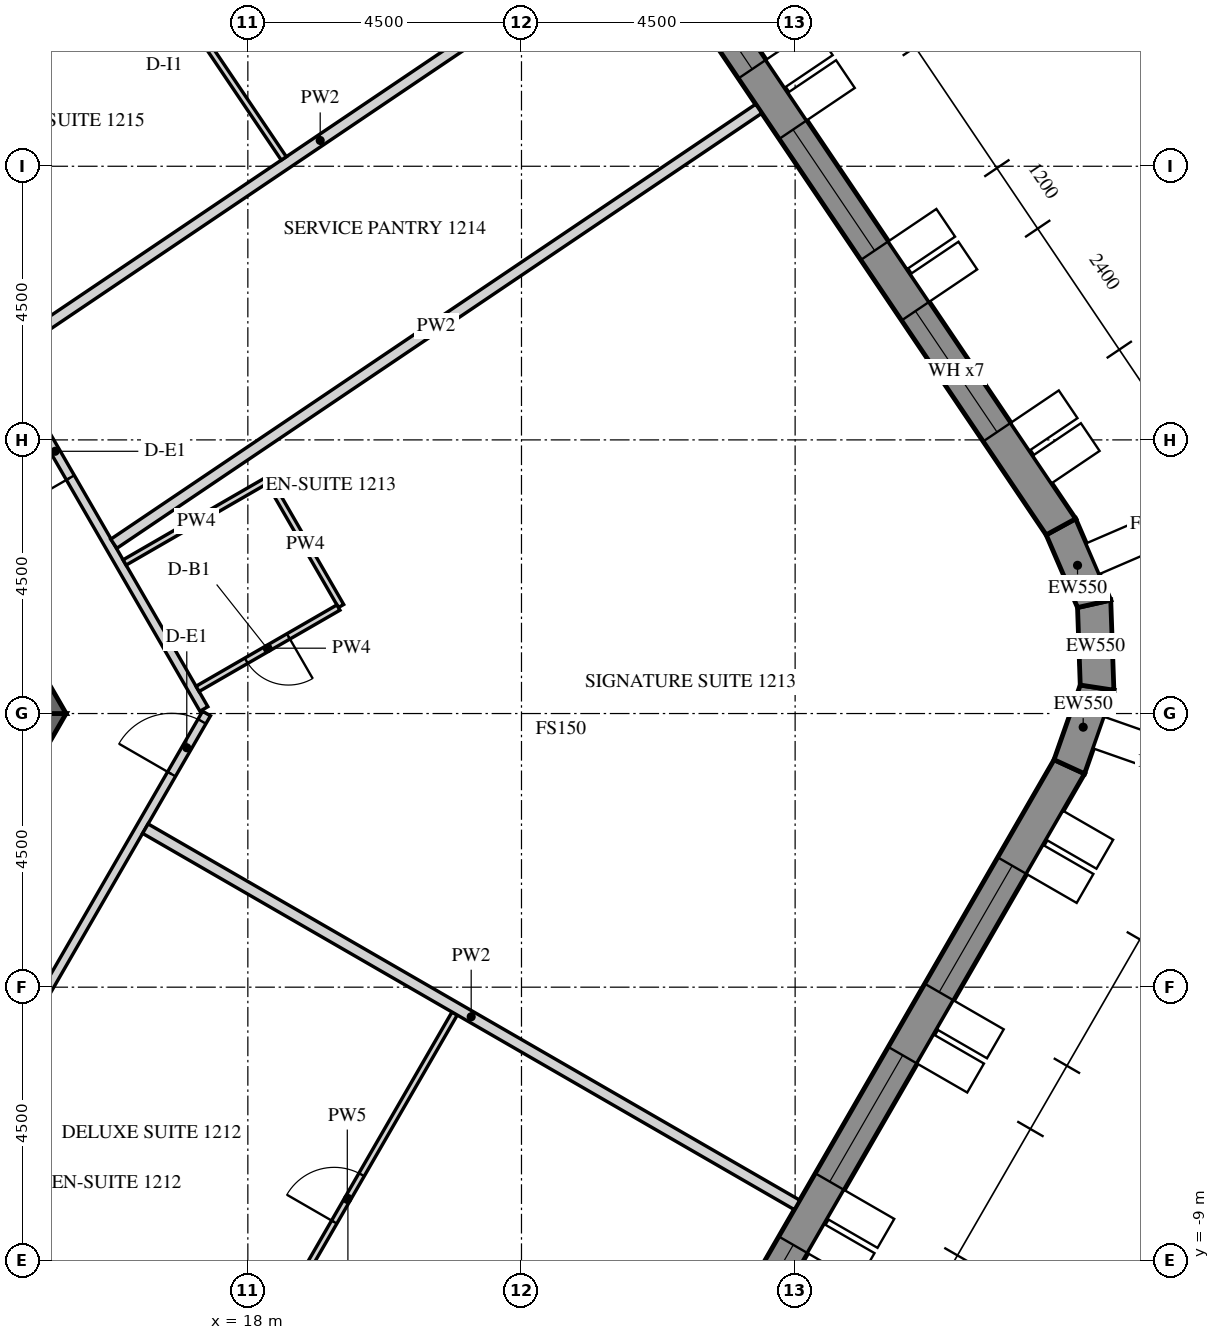
"""IFC4 building model, lengths in metres.
Left out: names, types, materials, properties, quantities, classifications, styles, units other than length and angle.
Written with IfcOpenShell. Run it as: python <this file> out.ifc"""

import sys

from ifc_helpers import new_model, si_unit, direction, frame, frame_2d, origin, place, context, subcontext, project, spatial, polyline, rectangle, outline, extrude, element, fill, save


model = new_model("IFC4")
c1 = context("Model", 3, precision=1e-05, world=origin(), true_north=direction((0.0, 1.0)))
c2 = subcontext(c1, "Body", "Model", "MODEL_VIEW")
j1 = project(units=[si_unit("LENGTHUNIT", "METRE"), si_unit("PLANEANGLEUNIT", "RADIAN")], contexts=[c1])
p1 = place(None, origin())
s1 = spatial("IfcSite", under=j1, at=p1, CompositionType="ELEMENT")
p2 = place(p1, origin())
s2 = spatial("IfcBuilding", under=s1, at=p2, CompositionType="ELEMENT")
p3 = place(p2, frame((0.0, 0.0, 164.4)))
s3 = spatial("IfcBuildingStorey", under=s2, at=p3, CompositionType="ELEMENT", Elevation=164.4)
p4 = place(p3, frame((17.63, -24.914, -0.15), z_axis=(0.0, 0.0, 1.0), x_axis=(0.499998569178, 0.866026229868, 0.0)))
e1 = element("IfcWall", 1, at=p4, inside=s3, PredefinedType="SOLIDWALL", context=c2, shape_type="SweptSolid", body=[
    extrude(outline(polyline([(-0.022, -0.275), (27.783, -0.275), (27.732, 0.275), (0.022, 0.275), (-0.022, -0.275)])), origin(), (0.0, 0.0, 1.0), 3.9),
])
p5 = place(p4, frame((1.879, 0.0, 1.05)))
e2 = element("IfcOpeningElement", 2, at=p5, cuts=e1, PredefinedType="OPENING", context=c2, shape_type="SweptSolid", body=[
    extrude(rectangle(XDim=2.4, YDim=2.4, at=frame_2d((1.2, 1.2))), frame((0.0, 0.285, 0.0), z_axis=(0.0, -1.0, 0.0), x_axis=(1.0, 0.0, 0.0)), (0.0, 0.0, 1.0), 0.57),
])
p6 = place(p4, frame((5.479, 0.0, 1.05)))
e3 = element("IfcOpeningElement", 3, at=p6, cuts=e1, PredefinedType="OPENING", context=c2, shape_type="SweptSolid", body=[
    extrude(rectangle(XDim=2.4, YDim=2.4, at=frame_2d((1.2, 1.2))), frame((0.0, 0.285, 0.0), z_axis=(0.0, -1.0, 0.0), x_axis=(1.0, 0.0, 0.0)), (0.0, 0.0, 1.0), 0.57),
])
p7 = place(p4, frame((9.079, 0.0, 1.05)))
e4 = element("IfcOpeningElement", 4, at=p7, cuts=e1, PredefinedType="OPENING", context=c2, shape_type="SweptSolid", body=[
    extrude(rectangle(XDim=2.4, YDim=2.4, at=frame_2d((1.2, 1.2))), frame((0.0, 0.285, 0.0), z_axis=(0.0, -1.0, 0.0), x_axis=(1.0, 0.0, 0.0)), (0.0, 0.0, 1.0), 0.57),
])
p8 = place(p4, frame((12.679, 0.0, 1.05)))
e5 = element("IfcOpeningElement", 5, at=p8, cuts=e1, PredefinedType="OPENING", context=c2, shape_type="SweptSolid", body=[
    extrude(rectangle(XDim=2.4, YDim=2.4, at=frame_2d((1.2, 1.2))), frame((0.0, 0.285, 0.0), z_axis=(0.0, -1.0, 0.0), x_axis=(1.0, 0.0, 0.0)), (0.0, 0.0, 1.0), 0.57),
])
p9 = place(p4, frame((16.279, 0.0, 1.05)))
e6 = element("IfcOpeningElement", 6, at=p9, cuts=e1, PredefinedType="OPENING", context=c2, shape_type="SweptSolid", body=[
    extrude(rectangle(XDim=2.4, YDim=2.4, at=frame_2d((1.2, 1.2))), frame((0.0, 0.285, 0.0), z_axis=(0.0, -1.0, 0.0), x_axis=(1.0, 0.0, 0.0)), (0.0, 0.0, 1.0), 0.57),
])
p10 = place(p4, frame((19.879, 0.0, 1.05)))
e7 = element("IfcOpeningElement", 7, at=p10, cuts=e1, PredefinedType="OPENING", context=c2, shape_type="SweptSolid", body=[
    extrude(rectangle(XDim=2.4, YDim=2.4, at=frame_2d((1.2, 1.2))), frame((0.0, 0.285, 0.0), z_axis=(0.0, -1.0, 0.0), x_axis=(1.0, 0.0, 0.0)), (0.0, 0.0, 1.0), 0.57),
])
p11 = place(p4, frame((23.479, 0.0, 1.05)))
e8 = element("IfcOpeningElement", 8, at=p11, cuts=e1, PredefinedType="OPENING", context=c2, shape_type="SweptSolid", body=[
    extrude(rectangle(XDim=2.4, YDim=2.4, at=frame_2d((1.2, 1.2))), frame((0.0, 0.285, 0.0), z_axis=(0.0, -1.0, 0.0), x_axis=(1.0, 0.0, 0.0)), (0.0, 0.0, 1.0), 0.57),
])
p12 = place(p3, frame((31.509, -0.875, -0.15), z_axis=(0.0, 0.0, 1.0), x_axis=(0.33111537203, 0.943590276765, 0.0)))
e9 = element("IfcWall", 9, at=p12, inside=s3, PredefinedType="SOLIDWALL", context=c2, shape_type="SweptSolid", body=[
    extrude(outline(polyline([(-0.026, -0.275), (1.431, -0.275), (1.327, 0.275), (0.026, 0.275), (-0.026, -0.275)])), origin(), (0.0, 0.0, 1.0), 3.9),
])
p13 = place(p3, frame((31.966, 0.426, -0.15), z_axis=(0.0, 0.0, 1.0), x_axis=(-0.034876908462, 0.999391615562, 0.0)))
e10 = element("IfcWall", 10, at=p13, inside=s3, PredefinedType="SOLIDWALL", context=c2, shape_type="SweptSolid", body=[
    extrude(outline(polyline([(-0.052, -0.275), (1.431, -0.275), (1.327, 0.275), (0.052, 0.275), (-0.052, -0.275)])), origin(), (0.0, 0.0, 1.0), 3.9),
])
p14 = place(p3, frame((31.917, 1.804, -0.15), z_axis=(0.0, 0.0, 1.0), x_axis=(-0.396225741392, 0.918153125496, 0.0)))
e11 = element("IfcWall", 11, at=p14, inside=s3, PredefinedType="SOLIDWALL", context=c2, shape_type="SweptSolid", body=[
    extrude(outline(polyline([(-0.052, -0.275), (1.405, -0.275), (1.353, 0.275), (0.052, 0.275), (-0.052, -0.275)])), origin(), (0.0, 0.0, 1.0), 3.9),
])
p15 = place(p3, frame((31.371, 3.071, -0.15), z_axis=(0.0, 0.0, 1.0), x_axis=(-0.559189891278, 0.829039604297, 0.0)))
e12 = element("IfcWall", 12, at=p15, inside=s3, PredefinedType="SOLIDWALL", context=c2, shape_type="SweptSolid", body=[
    extrude(outline(polyline([(-0.026, -0.275), (27.781, -0.275), (27.736, 0.275), (0.026, 0.275), (-0.026, -0.275)])), origin(), (0.0, 0.0, 1.0), 3.9),
])
p16 = place(p15, frame((1.879, 0.0, 1.05)))
e13 = element("IfcOpeningElement", 13, at=p16, cuts=e12, PredefinedType="OPENING", context=c2, shape_type="SweptSolid", body=[
    extrude(rectangle(XDim=2.4, YDim=2.4, at=frame_2d((1.2, 1.2))), frame((0.0, 0.285, 0.0), z_axis=(0.0, -1.0, 0.0), x_axis=(1.0, 0.0, 0.0)), (0.0, 0.0, 1.0), 0.57),
])
p17 = place(p15, frame((5.479, 0.0, 1.05)))
e14 = element("IfcOpeningElement", 14, at=p17, cuts=e12, PredefinedType="OPENING", context=c2, shape_type="SweptSolid", body=[
    extrude(rectangle(XDim=2.4, YDim=2.4, at=frame_2d((1.2, 1.2))), frame((0.0, 0.285, 0.0), z_axis=(0.0, -1.0, 0.0), x_axis=(1.0, 0.0, 0.0)), (0.0, 0.0, 1.0), 0.57),
])
p18 = place(p15, frame((9.079, 0.0, 1.05)))
e15 = element("IfcOpeningElement", 15, at=p18, cuts=e12, PredefinedType="OPENING", context=c2, shape_type="SweptSolid", body=[
    extrude(rectangle(XDim=2.4, YDim=2.4, at=frame_2d((1.2, 1.2))), frame((0.0, 0.285, 0.0), z_axis=(0.0, -1.0, 0.0), x_axis=(1.0, 0.0, 0.0)), (0.0, 0.0, 1.0), 0.57),
])
p19 = place(p15, frame((12.679, 0.0, 1.05)))
e16 = element("IfcOpeningElement", 16, at=p19, cuts=e12, PredefinedType="OPENING", context=c2, shape_type="SweptSolid", body=[
    extrude(rectangle(XDim=2.4, YDim=2.4, at=frame_2d((1.2, 1.2))), frame((0.0, 0.285, 0.0), z_axis=(0.0, -1.0, 0.0), x_axis=(1.0, 0.0, 0.0)), (0.0, 0.0, 1.0), 0.57),
])
p20 = place(p15, frame((16.279, 0.0, 1.05)))
e17 = element("IfcOpeningElement", 17, at=p20, cuts=e12, PredefinedType="OPENING", context=c2, shape_type="SweptSolid", body=[
    extrude(rectangle(XDim=2.4, YDim=2.4, at=frame_2d((1.2, 1.2))), frame((0.0, 0.285, 0.0), z_axis=(0.0, -1.0, 0.0), x_axis=(1.0, 0.0, 0.0)), (0.0, 0.0, 1.0), 0.57),
])
p21 = place(p15, frame((19.879, 0.0, 1.05)))
e18 = element("IfcOpeningElement", 18, at=p21, cuts=e12, PredefinedType="OPENING", context=c2, shape_type="SweptSolid", body=[
    extrude(rectangle(XDim=2.4, YDim=2.4, at=frame_2d((1.2, 1.2))), frame((0.0, 0.285, 0.0), z_axis=(0.0, -1.0, 0.0), x_axis=(1.0, 0.0, 0.0)), (0.0, 0.0, 1.0), 0.57),
])
p22 = place(p15, frame((23.479, 0.0, 1.05)))
e19 = element("IfcOpeningElement", 19, at=p22, cuts=e12, PredefinedType="OPENING", context=c2, shape_type="SweptSolid", body=[
    extrude(rectangle(XDim=2.4, YDim=2.4, at=frame_2d((1.2, 1.2))), frame((0.0, 0.285, 0.0), z_axis=(0.0, -1.0, 0.0), x_axis=(1.0, 0.0, 0.0)), (0.0, 0.0, 1.0), 0.57),
])
p23 = place(p3, frame((7.361, -12.75, -0.15), z_axis=(0.0, 0.0, 1.0), x_axis=(0.50000571537, 0.866022103989, 0.0)))
e20 = element("IfcWall", 20, at=p23, inside=s3, PredefinedType="SHEAR", context=c2, shape_type="SweptSolid", body=[
    extrude(outline(polyline([(-0.144, -0.25), (14.867, -0.25), (14.578, 0.25), (0.144, 0.25), (-0.144, -0.25)])), origin(), (0.0, 0.0, 1.0), 3.9),
])
p24 = place(p23, frame((6.49, 0.0, 0.15)))
e21 = element("IfcOpeningElement", 21, at=p24, cuts=e20, PredefinedType="OPENING", context=c2, shape_type="SweptSolid", body=[
    extrude(rectangle(XDim=1.8, YDim=2.4, at=frame_2d((0.9, 1.2))), frame((0.0, 0.26, 0.0), z_axis=(0.0, -1.0, 0.0), x_axis=(1.0, 0.0, 0.0)), (0.0, 0.0, 1.0), 0.52),
])
p25 = place(p3, frame((14.722, 0.0, -0.15), z_axis=(0.0, 0.0, 1.0), x_axis=(-0.50000571537, 0.866022103989, 0.0)))
e22 = element("IfcWall", 22, at=p25, inside=s3, PredefinedType="SHEAR", context=c2, shape_type="SweptSolid", body=[
    extrude(outline(polyline([(-0.144, -0.25), (14.867, -0.25), (14.578, 0.25), (0.144, 0.25), (-0.144, -0.25)])), origin(), (0.0, 0.0, 1.0), 3.9),
])
p26 = place(p25, frame((6.432, 0.0, 0.15)))
e23 = element("IfcOpeningElement", 23, at=p26, cuts=e22, PredefinedType="OPENING", context=c2, shape_type="SweptSolid", body=[
    extrude(rectangle(XDim=1.8, YDim=2.4, at=frame_2d((0.9, 1.2))), frame((0.0, 0.26, 0.0), z_axis=(0.0, -1.0, 0.0), x_axis=(1.0, 0.0, 0.0)), (0.0, 0.0, 1.0), 0.52),
])
p27 = place(p3, frame((10.887, -11.144, 0.0), z_axis=(0.0, 0.0, 1.0), x_axis=(0.500006037985, 0.866021917724, 0.0)))
e24 = element("IfcWall", 24, at=p27, inside=s3, PredefinedType="PARTITIONING", context=c2, shape_type="SweptSolid", body=[
    extrude(rectangle(XDim=12.867, YDim=0.15, at=frame_2d((6.434, 0.0))), origin(), (0.0, 0.0, 1.0), 2.988),
])
p28 = place(p27, frame((6.225, 0.0, 0.0)))
e25 = element("IfcOpeningElement", 25, at=p28, cuts=e24, PredefinedType="OPENING", context=c2, shape_type="SweptSolid", body=[
    extrude(rectangle(XDim=1.0, YDim=2.1, at=frame_2d((0.5, 1.05))), frame((0.0, 0.085, 0.0), z_axis=(0.0, -1.0, 0.0), x_axis=(1.0, 0.0, 0.0)), (0.0, 0.0, 1.0), 0.17),
])
p29 = place(p27, frame((11.717, 0.0, 0.0)))
e26 = element("IfcOpeningElement", 26, at=p29, cuts=e24, PredefinedType="OPENING", context=c2, shape_type="SweptSolid", body=[
    extrude(rectangle(XDim=1.0, YDim=2.1, at=frame_2d((0.5, 1.05))), frame((0.0, 0.085, 0.0), z_axis=(0.0, -1.0, 0.0), x_axis=(1.0, 0.0, 0.0)), (0.0, 0.0, 1.0), 0.17),
])
p30 = place(p3, frame((17.277, 0.075, 0.0), z_axis=(0.0, 0.0, 1.0), x_axis=(-0.499988884089, 0.866031821464, 0.0)))
e27 = element("IfcWall", 27, at=p30, inside=s3, PredefinedType="PARTITIONING", context=c2, shape_type="SweptSolid", body=[
    extrude(rectangle(XDim=14.78, YDim=0.15, at=frame_2d((7.39, 0.0))), origin(), (0.0, 0.0, 1.0), 2.988),
])
p31 = place(p30, frame((4.393, 0.0, 0.0)))
e28 = element("IfcOpeningElement", 28, at=p31, cuts=e27, PredefinedType="OPENING", context=c2, shape_type="SweptSolid", body=[
    extrude(rectangle(XDim=1.0, YDim=2.1, at=frame_2d((0.5, 1.05))), frame((0.0, 0.085, 0.0), z_axis=(0.0, -1.0, 0.0), x_axis=(1.0, 0.0, 0.0)), (0.0, 0.0, 1.0), 0.17),
])
p32 = place(p30, frame((8.885, 0.0, 0.0)))
e29 = element("IfcOpeningElement", 29, at=p32, cuts=e27, PredefinedType="OPENING", context=c2, shape_type="SweptSolid", body=[
    extrude(rectangle(XDim=1.0, YDim=2.1, at=frame_2d((0.5, 1.05))), frame((0.0, 0.085, 0.0), z_axis=(0.0, -1.0, 0.0), x_axis=(1.0, 0.0, 0.0)), (0.0, 0.0, 1.0), 0.17),
])
p33 = place(p3, frame((12.314, -8.821, 0.0), z_axis=(0.0, 0.0, 1.0), x_axis=(0.866046596414, -0.499963291492, 0.0)))
e30 = element("IfcWall", 30, at=p33, inside=s3, PredefinedType="PARTITIONING", context=c2, shape_type="SweptSolid", body=[
    extrude(rectangle(XDim=2.925, YDim=0.1, at=frame_2d((1.462, 0.0))), origin(), (0.0, 0.0, 1.0), 2.988),
])
p34 = place(p33, frame((1.025, 0.0, 0.0)))
e31 = element("IfcOpeningElement", 31, at=p34, cuts=e30, PredefinedType="OPENING", context=c2, shape_type="SweptSolid", body=[
    extrude(rectangle(XDim=0.8, YDim=2.1, at=frame_2d((0.4, 1.05))), frame((0.0, 0.06, 0.0), z_axis=(0.0, -1.0, 0.0), x_axis=(1.0, 0.0, 0.0)), (0.0, 0.0, 1.0), 0.12),
])
p35 = place(p3, frame((17.87, -11.047, 0.0), z_axis=(0.0, 0.0, 1.0), x_axis=(0.500010820671, 0.866019156377, 0.0)))
e32 = element("IfcWall", 32, at=p35, inside=s3, PredefinedType="PARTITIONING", context=c2, shape_type="SweptSolid", body=[
    extrude(rectangle(XDim=7.06, YDim=0.1, at=frame_2d((3.53, 0.0))), origin(), (0.0, 0.0, 1.0), 2.988),
])
p36 = place(p35, frame((3.1, 0.0, 0.0)))
e33 = element("IfcOpeningElement", 33, at=p36, cuts=e32, PredefinedType="OPENING", context=c2, shape_type="SweptSolid", body=[
    extrude(rectangle(XDim=0.9, YDim=2.1, at=frame_2d((0.45, 1.05))), frame((0.0, 0.06, 0.0), z_axis=(0.0, -1.0, 0.0), x_axis=(1.0, 0.0, 0.0)), (0.0, 0.0, 1.0), 0.12),
])
p37 = place(p3, frame((27.031, -8.08, 0.0), z_axis=(0.0, 0.0, 1.0), x_axis=(-0.866024931941, 0.500000817256, 0.0)))
e34 = element("IfcWall", 34, at=p37, inside=s3, PredefinedType="PARTITIONING", context=c2, shape_type="SweptSolid", body=[
    extrude(rectangle(XDim=12.375, YDim=0.18, at=frame_2d((6.188, 0.0))), origin(), (0.0, 0.0, 1.0), 2.988),
])
p38 = place(p3, frame((15.973, 2.484, 0.0), z_axis=(0.0, 0.0, 1.0), x_axis=(0.866051307416, 0.49995513091, 0.0)))
e35 = element("IfcWall", 35, at=p38, inside=s3, PredefinedType="PARTITIONING", context=c2, shape_type="SweptSolid", body=[
    extrude(rectangle(XDim=2.725, YDim=0.1, at=frame_2d((1.362, 0.0))), origin(), (0.0, 0.0, 1.0), 2.988),
])
p39 = place(p3, frame((18.358, 3.803, 0.0), z_axis=(0.0, 0.0, 1.0), x_axis=(0.500016218704, -0.866016039709, 0.0)))
e36 = element("IfcWall", 36, at=p39, inside=s3, PredefinedType="PARTITIONING", context=c2, shape_type="SweptSolid", body=[
    extrude(rectangle(XDim=2.35, YDim=0.1, at=frame_2d((1.175, 0.0))), origin(), (0.0, 0.0, 1.0), 2.988),
])
p40 = place(p3, frame((19.49, 1.743, 0.0), z_axis=(0.0, 0.0, 1.0), x_axis=(-0.866004723184, -0.50003581814, 0.0)))
e37 = element("IfcWall", 37, at=p40, inside=s3, PredefinedType="PARTITIONING", context=c2, shape_type="SweptSolid", body=[
    extrude(rectangle(XDim=2.675, YDim=0.1, at=frame_2d((1.337, 0.0))), origin(), (0.0, 0.0, 1.0), 2.988),
])
p41 = place(p40, frame((0.95, 0.0, 0.0)))
e38 = element("IfcOpeningElement", 38, at=p41, cuts=e37, PredefinedType="OPENING", context=c2, shape_type="SweptSolid", body=[
    extrude(rectangle(XDim=0.8, YDim=2.1, at=frame_2d((0.4, 1.05))), frame((0.0, 0.06, 0.0), z_axis=(0.0, -1.0, 0.0), x_axis=(1.0, 0.0, 0.0)), (0.0, 0.0, 1.0), 0.12),
])
p42 = place(p3, frame((26.402, 9.946, 0.0), z_axis=(0.0, 0.0, 1.0), x_axis=(-0.829037771727, -0.559192608187, 0.0)))
e39 = element("IfcWall", 39, at=p42, inside=s3, PredefinedType="PARTITIONING", context=c2, shape_type="SweptSolid", body=[
    extrude(rectangle(XDim=12.794, YDim=0.18, at=frame_2d((6.397, 0.0))), origin(), (0.0, 0.0, 1.0), 2.988),
])
p43 = place(p3, frame((24.389, 12.931, 0.0), z_axis=(0.0, 0.0, 1.0), x_axis=(-0.829040439793, -0.559188652593, 0.0)))
e40 = element("IfcWall", 40, at=p43, inside=s3, PredefinedType="PARTITIONING", context=c2, shape_type="SweptSolid", body=[
    extrude(rectangle(XDim=12.542, YDim=0.18, at=frame_2d((6.271, 0.0))), origin(), (0.0, 0.0, 1.0), 2.988),
])
p44 = place(p3, frame((18.591, 9.129, 0.0), z_axis=(0.0, 0.0, 1.0), x_axis=(-0.559185029686, 0.829042883435, 0.0)))
e41 = element("IfcWall", 41, at=p44, inside=s3, PredefinedType="PARTITIONING", context=c2, shape_type="SweptSolid", body=[
    extrude(rectangle(XDim=7.11, YDim=0.1, at=frame_2d((3.555, 0.0))), origin(), (0.0, 0.0, 1.0), 2.988),
])
p45 = place(p44, frame((3.06, 0.0, 0.0)))
e42 = element("IfcOpeningElement", 42, at=p45, cuts=e41, PredefinedType="OPENING", context=c2, shape_type="SweptSolid", body=[
    extrude(rectangle(XDim=0.9, YDim=2.1, at=frame_2d((0.45, 1.05))), frame((0.0, 0.06, 0.0), z_axis=(0.0, -1.0, 0.0), x_axis=(1.0, 0.0, 0.0)), (0.0, 0.0, 1.0), 0.12),
])
p46 = place(p9, frame((0.0, 0.205, 0.0)))
e43 = element("IfcWindow", 43, at=p46, inside=s3, PartitioningType="DOUBLE_PANEL_VERTICAL", PredefinedType="WINDOW", context=c2, shape_type="SweptSolid", body=[
    extrude(rectangle(XDim=2.4, YDim=2.4, at=frame_2d((1.2, 1.2))), frame((0.0, 0.03, 0.0), z_axis=(0.0, -1.0, 0.0), x_axis=(1.0, 0.0, 0.0)), (0.0, 0.0, 1.0), 0.06),
])
fill(e6, e43)
p47 = place(p10, frame((0.0, 0.205, 0.0)))
e44 = element("IfcWindow", 44, at=p47, inside=s3, PartitioningType="DOUBLE_PANEL_VERTICAL", PredefinedType="WINDOW", context=c2, shape_type="SweptSolid", body=[
    extrude(rectangle(XDim=2.4, YDim=2.4, at=frame_2d((1.2, 1.2))), frame((0.0, 0.03, 0.0), z_axis=(0.0, -1.0, 0.0), x_axis=(1.0, 0.0, 0.0)), (0.0, 0.0, 1.0), 0.06),
])
fill(e7, e44)
p48 = place(p11, frame((0.0, 0.205, 0.0)))
e45 = element("IfcWindow", 45, at=p48, inside=s3, PartitioningType="DOUBLE_PANEL_VERTICAL", PredefinedType="WINDOW", context=c2, shape_type="SweptSolid", body=[
    extrude(rectangle(XDim=2.4, YDim=2.4, at=frame_2d((1.2, 1.2))), frame((0.0, 0.03, 0.0), z_axis=(0.0, -1.0, 0.0), x_axis=(1.0, 0.0, 0.0)), (0.0, 0.0, 1.0), 0.06),
])
fill(e8, e45)
p49 = place(p16, frame((0.0, 0.205, 0.0)))
e46 = element("IfcWindow", 46, at=p49, inside=s3, PartitioningType="DOUBLE_PANEL_VERTICAL", PredefinedType="WINDOW", context=c2, shape_type="SweptSolid", body=[
    extrude(rectangle(XDim=2.4, YDim=2.4, at=frame_2d((1.2, 1.2))), frame((0.0, 0.03, 0.0), z_axis=(0.0, -1.0, 0.0), x_axis=(1.0, 0.0, 0.0)), (0.0, 0.0, 1.0), 0.06),
])
fill(e13, e46)
p50 = place(p17, frame((0.0, 0.205, 0.0)))
e47 = element("IfcWindow", 47, at=p50, inside=s3, PartitioningType="DOUBLE_PANEL_VERTICAL", PredefinedType="WINDOW", context=c2, shape_type="SweptSolid", body=[
    extrude(rectangle(XDim=2.4, YDim=2.4, at=frame_2d((1.2, 1.2))), frame((0.0, 0.03, 0.0), z_axis=(0.0, -1.0, 0.0), x_axis=(1.0, 0.0, 0.0)), (0.0, 0.0, 1.0), 0.06),
])
fill(e14, e47)
p51 = place(p18, frame((0.0, 0.205, 0.0)))
e48 = element("IfcWindow", 48, at=p51, inside=s3, PartitioningType="DOUBLE_PANEL_VERTICAL", PredefinedType="WINDOW", context=c2, shape_type="SweptSolid", body=[
    extrude(rectangle(XDim=2.4, YDim=2.4, at=frame_2d((1.2, 1.2))), frame((0.0, 0.03, 0.0), z_axis=(0.0, -1.0, 0.0), x_axis=(1.0, 0.0, 0.0)), (0.0, 0.0, 1.0), 0.06),
])
fill(e15, e48)
p52 = place(p36, origin())
e49 = element("IfcDoor", 49, at=p52, inside=s3, OperationType="SINGLE_SWING_LEFT", PredefinedType="DOOR", context=c2, shape_type="SweptSolid", body=[
    extrude(rectangle(XDim=0.9, YDim=2.1, at=frame_2d((0.45, 1.05))), frame((0.0, 0.025, 0.0), z_axis=(0.0, -1.0, 0.0), x_axis=(1.0, 0.0, 0.0)), (0.0, 0.0, 1.0), 0.05),
])
fill(e33, e49)
p53 = place(p29, origin())
e50 = element("IfcDoor", 50, at=p53, inside=s3, OperationType="SINGLE_SWING_LEFT", PredefinedType="DOOR", context=c2, shape_type="SweptSolid", body=[
    extrude(rectangle(XDim=1.0, YDim=2.1, at=frame_2d((0.5, 1.05))), frame((0.0, 0.025, 0.0), z_axis=(0.0, -1.0, 0.0), x_axis=(1.0, 0.0, 0.0)), (0.0, 0.0, 1.0), 0.05),
])
fill(e26, e50)
p54 = place(p41, origin())
e51 = element("IfcDoor", 51, at=p54, inside=s3, OperationType="SINGLE_SWING_RIGHT", PredefinedType="DOOR", context=c2, shape_type="SweptSolid", body=[
    extrude(rectangle(XDim=0.8, YDim=2.1, at=frame_2d((0.4, 1.05))), frame((0.0, 0.025, 0.0), z_axis=(0.0, -1.0, 0.0), x_axis=(1.0, 0.0, 0.0)), (0.0, 0.0, 1.0), 0.05),
])
fill(e38, e51)
p55 = place(p31, origin())
e52 = element("IfcDoor", 52, at=p55, inside=s3, OperationType="SINGLE_SWING_LEFT", PredefinedType="DOOR", context=c2, shape_type="SweptSolid", body=[
    extrude(rectangle(XDim=1.0, YDim=2.1, at=frame_2d((0.5, 1.05))), frame((0.0, 0.025, 0.0), z_axis=(0.0, -1.0, 0.0), x_axis=(1.0, 0.0, 0.0)), (0.0, 0.0, 1.0), 0.05),
])
fill(e28, e52)
save(model, sys.argv[1])
